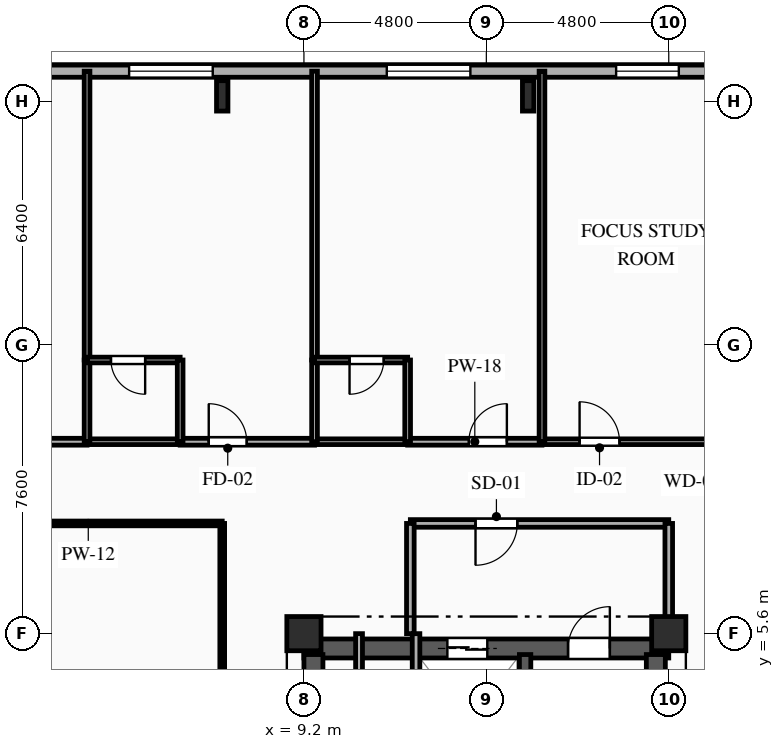
"""IFC4 building model, lengths in metres.
Left out: names, types, materials, properties, quantities, classifications, styles, units other than length and angle.
Written with IfcOpenShell. Run it as: python <this file> out.ifc"""

import sys

from ifc_helpers import new_model, si_unit, direction, frame, frame_2d, origin, origin_2d, place, context, subcontext, project, spatial, rectangle, i_section, extrude, element, fill, save


model = new_model("IFC4")
c1 = context("Model", 3, precision=1e-05, world=origin(), true_north=direction((0.0, 1.0)))
c2 = subcontext(c1, "Body", "Model", "MODEL_VIEW")
j1 = project(units=[si_unit("LENGTHUNIT", "METRE"), si_unit("PLANEANGLEUNIT", "RADIAN")], contexts=[c1])
p1 = place(None, origin())
s1 = spatial("IfcSite", under=j1, at=p1, CompositionType="ELEMENT")
p2 = place(p1, origin())
s2 = spatial("IfcBuilding", under=s1, at=p2, CompositionType="ELEMENT")
p3 = place(p2, frame((0.0, 0.0, 137.7)))
s3 = spatial("IfcBuildingStorey", under=s2, at=p3, CompositionType="ELEMENT", Elevation=137.7)
for number, where, z_axis, x_axis in (
    (1, (9.2, 5.6, 0.0), (0.0, 0.0, 1.0), (1.0, 0.0, 0.0)),
    (2, (18.8, 5.6, 0.0), (0.0, 0.0, 1.0), (1.0, 0.0, 0.0)),
):
    element("IfcColumn", number, at=place(p3, frame(where, z_axis=z_axis, x_axis=x_axis)), inside=s3, PredefinedType="COLUMN", context=c2, shape_type="SweptSolid", body=[
        extrude(rectangle(XDim=0.9, YDim=0.9, at=origin_2d()), origin(), (0.0, 0.0, 1.0), 3.35),
    ])
for number, where, z_axis, x_axis in (
    (3, (15.1, 19.75, 0.0), (0.0, 0.0, 1.0), (1.0, 0.0, 0.0)),
    (4, (7.05, 19.75, 0.0), (0.0, 0.0, 1.0), (1.0, 0.0, 0.0)),
):
    element("IfcColumn", number, at=place(p3, frame(where, z_axis=z_axis, x_axis=x_axis)), inside=s3, PredefinedType="COLUMN", context=c2, shape_type="SweptSolid", body=[
        extrude(i_section(OverallWidth=0.3, OverallDepth=0.8, WebThickness=0.018, FlangeThickness=0.033, FilletRadius=0.03, at=origin_2d()), origin(), (0.0, 0.0, 1.0), 3.35),
    ])
p4 = place(p3, frame((-25.8, 20.4, 0.0), z_axis=(0.0, 0.0, 1.0), x_axis=(1.0, 0.0, 0.0)))
e5 = element("IfcWall", 5, at=p4, inside=s3, PredefinedType="SOLIDWALL", context=c2, shape_type="SweptSolid", body=[
    extrude(rectangle(XDim=49.6, YDim=0.32, at=frame_2d((24.8, 0.0))), origin(), (0.0, 0.0, 1.0), 3.04),
])
p5 = place(p4, frame((2.135, 0.0, 0.85)))
e6 = element("IfcOpeningElement", 6, at=p5, cuts=e5, PredefinedType="OPENING", context=c2, shape_type="SweptSolid", body=[
    extrude(rectangle(XDim=1.65, YDim=1.85, at=frame_2d((0.825, 0.925))), frame((0.0, 0.17, 0.0), z_axis=(0.0, -1.0, 0.0), x_axis=(1.0, 0.0, 0.0)), (0.0, 0.0, 1.0), 0.34),
])
p6 = place(p4, frame((6.706, 0.0, 0.85)))
e7 = element("IfcOpeningElement", 7, at=p6, cuts=e5, PredefinedType="OPENING", context=c2, shape_type="SweptSolid", body=[
    extrude(rectangle(XDim=1.65, YDim=1.85, at=frame_2d((0.825, 0.925))), frame((0.0, 0.17, 0.0), z_axis=(0.0, -1.0, 0.0), x_axis=(1.0, 0.0, 0.0)), (0.0, 0.0, 1.0), 0.34),
])
p7 = place(p4, frame((14.81, 0.0, 0.85)))
e8 = element("IfcOpeningElement", 8, at=p7, cuts=e5, PredefinedType="OPENING", context=c2, shape_type="SweptSolid", body=[
    extrude(rectangle(XDim=1.5, YDim=1.85, at=frame_2d((0.75, 0.925))), frame((0.0, 0.17, 0.0), z_axis=(0.0, -1.0, 0.0), x_axis=(1.0, 0.0, 0.0)), (0.0, 0.0, 1.0), 0.34),
])
p8 = place(p4, frame((19.26, 0.0, 0.85)))
e9 = element("IfcOpeningElement", 9, at=p8, cuts=e5, PredefinedType="OPENING", context=c2, shape_type="SweptSolid", body=[
    extrude(rectangle(XDim=2.2, YDim=1.85, at=frame_2d((1.1, 0.925))), frame((0.0, 0.17, 0.0), z_axis=(0.0, -1.0, 0.0), x_axis=(1.0, 0.0, 0.0)), (0.0, 0.0, 1.0), 0.34),
])
p9 = place(p4, frame((25.26, 0.0, 0.85)))
e10 = element("IfcOpeningElement", 10, at=p9, cuts=e5, PredefinedType="OPENING", context=c2, shape_type="SweptSolid", body=[
    extrude(rectangle(XDim=2.2, YDim=1.85, at=frame_2d((1.1, 0.925))), frame((0.0, 0.17, 0.0), z_axis=(0.0, -1.0, 0.0), x_axis=(1.0, 0.0, 0.0)), (0.0, 0.0, 1.0), 0.34),
])
p10 = place(p4, frame((30.4, 0.0, 0.85)))
e11 = element("IfcOpeningElement", 11, at=p10, cuts=e5, PredefinedType="OPENING", context=c2, shape_type="SweptSolid", body=[
    extrude(rectangle(XDim=2.2, YDim=1.85, at=frame_2d((1.1, 0.925))), frame((0.0, 0.17, 0.0), z_axis=(0.0, -1.0, 0.0), x_axis=(1.0, 0.0, 0.0)), (0.0, 0.0, 1.0), 0.34),
])
p11 = place(p4, frame((37.18, 0.0, 0.85)))
e12 = element("IfcOpeningElement", 12, at=p11, cuts=e5, PredefinedType="OPENING", context=c2, shape_type="SweptSolid", body=[
    extrude(rectangle(XDim=2.2, YDim=1.85, at=frame_2d((1.1, 0.925))), frame((0.0, 0.17, 0.0), z_axis=(0.0, -1.0, 0.0), x_axis=(1.0, 0.0, 0.0)), (0.0, 0.0, 1.0), 0.34),
])
p12 = place(p4, frame((43.215, 0.0, 0.85)))
e13 = element("IfcOpeningElement", 13, at=p12, cuts=e5, PredefinedType="OPENING", context=c2, shape_type="SweptSolid", body=[
    extrude(rectangle(XDim=1.65, YDim=1.85, at=frame_2d((0.825, 0.925))), frame((0.0, 0.17, 0.0), z_axis=(0.0, -1.0, 0.0), x_axis=(1.0, 0.0, 0.0)), (0.0, 0.0, 1.0), 0.34),
])
p13 = place(p4, frame((47.45, 0.0, 0.85)))
e14 = element("IfcOpeningElement", 14, at=p13, cuts=e5, PredefinedType="OPENING", context=c2, shape_type="SweptSolid", body=[
    extrude(rectangle(XDim=1.1, YDim=1.85, at=frame_2d((0.55, 0.925))), frame((0.0, 0.17, 0.0), z_axis=(0.0, -1.0, 0.0), x_axis=(1.0, 0.0, 0.0)), (0.0, 0.0, 1.0), 0.34),
])
p14 = place(p3, frame((9.2, 5.21, 0.0), z_axis=(0.0, 0.0, 1.0), x_axis=(1.0, 0.0, 0.0)))
e15 = element("IfcWall", 15, at=p14, inside=s3, PredefinedType="SHEAR", context=c2, shape_type="SweptSolid", body=[
    extrude(rectangle(XDim=9.6, YDim=0.5, at=frame_2d((4.8, 0.0))), origin(), (0.0, 0.0, 1.0), 3.04),
])
p15 = place(p14, frame((6.95, 0.0, 0.0)))
e16 = element("IfcOpeningElement", 16, at=p15, cuts=e15, PredefinedType="OPENING", context=c2, shape_type="SweptSolid", body=[
    extrude(rectangle(XDim=1.1, YDim=2.15, at=frame_2d((0.55, 1.075))), frame((0.0, 0.26, 0.0), z_axis=(0.0, -1.0, 0.0), x_axis=(1.0, 0.0, 0.0)), (0.0, 0.0, 1.0), 0.52),
])
p16 = place(p14, frame((3.775, 0.0, 0.0)))
e17 = element("IfcOpeningElement", 17, at=p16, cuts=e15, PredefinedType="OPENING", context=c2, shape_type="SweptSolid", body=[
    extrude(rectangle(XDim=1.05, YDim=2.1, at=frame_2d((0.525, 1.05))), frame((0.0, 0.26, 0.0), z_axis=(0.0, -1.0, 0.0), x_axis=(1.0, 0.0, 0.0)), (0.0, 0.0, 1.0), 0.52),
])
p17 = place(p3, frame((9.45, -5.05, 0.0), z_axis=(0.0, 0.0, 1.0), x_axis=(0.0, 1.0, 0.0)))
e18 = element("IfcWall", 18, at=p17, inside=s3, PredefinedType="SHEAR", context=c2, shape_type="SweptSolid", body=[
    extrude(rectangle(XDim=10.1, YDim=0.5, at=frame_2d((5.05, 0.0))), origin(), (0.0, 0.0, 1.0), 3.04),
])
p18 = place(p17, frame((7.15, 0.0, 0.0)))
e19 = element("IfcOpeningElement", 19, at=p18, cuts=e18, PredefinedType="OPENING", context=c2, shape_type="SweptSolid", body=[
    extrude(rectangle(XDim=0.9, YDim=2.1, at=frame_2d((0.45, 1.05))), frame((0.0, 0.26, 0.0), z_axis=(0.0, -1.0, 0.0), x_axis=(1.0, 0.0, 0.0)), (0.0, 0.0, 1.0), 0.52),
])
p19 = place(p17, frame((2.4, 0.0, 0.0)))
e20 = element("IfcOpeningElement", 20, at=p19, cuts=e18, PredefinedType="OPENING", context=c2, shape_type="SweptSolid", body=[
    extrude(rectangle(XDim=1.2, YDim=2.15, at=frame_2d((0.6, 1.075))), frame((0.0, 0.26, 0.0), z_axis=(0.0, -1.0, 0.0), x_axis=(1.0, 0.0, 0.0)), (0.0, 0.0, 1.0), 0.52),
])
p20 = place(p3, frame((18.46, -5.05, 0.0), z_axis=(0.0, 0.0, 1.0), x_axis=(0.0, 1.0, 0.0)))
e21 = element("IfcWall", 21, at=p20, inside=s3, PredefinedType="SHEAR", context=c2, shape_type="SweptSolid", body=[
    extrude(rectangle(XDim=10.1, YDim=0.5, at=frame_2d((5.05, 0.0))), origin(), (0.0, 0.0, 1.0), 3.04),
])
p21 = place(p3, frame((15.02, -5.05, 0.0), z_axis=(0.0, 0.0, 1.0), x_axis=(0.0, 1.0, 0.0)))
e22 = element("IfcWall", 22, at=p21, inside=s3, PredefinedType="SHEAR", context=c2, shape_type="SweptSolid", body=[
    extrude(rectangle(XDim=10.1, YDim=0.3, at=frame_2d((5.05, 0.0))), origin(), (0.0, 0.0, 1.0), 3.04),
])
p22 = place(p3, frame((12.15, 5.6, 0.0), z_axis=(0.0, 0.0, 1.0), x_axis=(0.0, -1.0, 0.0)))
e23 = element("IfcWall", 23, at=p22, inside=s3, PredefinedType="PARTITIONING", context=c2, shape_type="SweptSolid", body=[
    extrude(rectangle(XDim=4.05, YDim=0.2, at=frame_2d((2.025, 0.0))), origin(), (0.0, 0.0, 1.0), 3.04),
])
p23 = place(p3, frame((18.8, 8.5, 0.0), z_axis=(0.0, 0.0, 1.0), x_axis=(-1.0, 0.0, 0.0)))
e24 = element("IfcWall", 24, at=p23, inside=s3, PredefinedType="PARTITIONING", context=c2, shape_type="SweptSolid", body=[
    extrude(rectangle(XDim=6.8, YDim=0.2, at=frame_2d((3.4, 0.0))), origin(), (0.0, 0.0, 1.0), 3.04),
])
p24 = place(p23, frame((3.985, 0.0, 0.0)))
e25 = element("IfcOpeningElement", 25, at=p24, cuts=e24, PredefinedType="OPENING", context=c2, shape_type="SweptSolid", body=[
    extrude(rectangle(XDim=1.1, YDim=2.15, at=frame_2d((0.55, 1.075))), frame((0.0, 0.11, 0.0), z_axis=(0.0, -1.0, 0.0), x_axis=(1.0, 0.0, 0.0)), (0.0, 0.0, 1.0), 0.22),
])
p25 = place(p3, frame((18.8, 5.6, 0.0), z_axis=(0.0, 0.0, 1.0), x_axis=(0.0, 1.0, 0.0)))
e26 = element("IfcWall", 26, at=p25, inside=s3, PredefinedType="PARTITIONING", context=c2, shape_type="SweptSolid", body=[
    extrude(rectangle(XDim=2.9, YDim=0.2, at=frame_2d((1.45, 0.0))), origin(), (0.0, 0.0, 1.0), 2.525),
])
p26 = place(p3, frame((12.0, 8.5, 0.0), z_axis=(0.0, 0.0, 1.0), x_axis=(0.0, -1.0, 0.0)))
e27 = element("IfcWall", 27, at=p26, inside=s3, PredefinedType="PARTITIONING", context=c2, shape_type="SweptSolid", body=[
    extrude(rectangle(XDim=2.9, YDim=0.2, at=frame_2d((1.45, 0.0))), origin(), (0.0, 0.0, 1.0), 3.04),
])
p27 = place(p3, frame((10.65, 1.55, 0.0), z_axis=(0.0, 0.0, 1.0), x_axis=(0.0, 1.0, 0.0)))
e28 = element("IfcWall", 28, at=p27, inside=s3, PredefinedType="PARTITIONING", context=c2, shape_type="SweptSolid", body=[
    extrude(rectangle(XDim=4.05, YDim=0.18, at=frame_2d((2.025, 0.0))), origin(), (0.0, 0.0, 1.0), 3.04),
])
p28 = place(p27, frame((0.829, 0.0, 0.0)))
e29 = element("IfcOpeningElement", 29, at=p28, cuts=e28, PredefinedType="OPENING", context=c2, shape_type="SweptSolid", body=[
    extrude(rectangle(XDim=0.9, YDim=2.1, at=frame_2d((0.45, 1.05))), frame((0.0, 0.1, 0.0), z_axis=(0.0, -1.0, 0.0), x_axis=(1.0, 0.0, 0.0)), (0.0, 0.0, 1.0), 0.2),
])
p29 = place(p3, frame((0.0, 10.65, 0.0), z_axis=(0.0, 0.0, 1.0), x_axis=(1.0, 0.0, 0.0)))
e30 = element("IfcWall", 30, at=p29, inside=s3, PredefinedType="PARTITIONING", context=c2, shape_type="SweptSolid", body=[
    extrude(rectangle(XDim=3.493, YDim=0.18, at=frame_2d((1.747, 0.0))), origin(), (0.0, 0.0, 1.0), 3.04),
])
p30 = place(p29, frame((0.747, 0.0, 0.0)))
e31 = element("IfcOpeningElement", 31, at=p30, cuts=e30, PredefinedType="OPENING", context=c2, shape_type="SweptSolid", body=[
    extrude(rectangle(XDim=1.0, YDim=2.15, at=frame_2d((0.5, 1.075))), frame((0.0, 0.1, 0.0), z_axis=(0.0, -1.0, 0.0), x_axis=(1.0, 0.0, 0.0)), (0.0, 0.0, 1.0), 0.2),
])
p31 = place(p3, frame((5.943, 10.65, 0.0), z_axis=(0.0, 0.0, 1.0), x_axis=(1.0, 0.0, 0.0)))
e32 = element("IfcWall", 32, at=p31, inside=s3, PredefinedType="PARTITIONING", context=c2, shape_type="SweptSolid", body=[
    extrude(rectangle(XDim=3.536, YDim=0.18, at=frame_2d((1.768, 0.0))), origin(), (0.0, 0.0, 1.0), 3.04),
])
p32 = place(p31, frame((0.752, 0.0, 0.0)))
e33 = element("IfcOpeningElement", 33, at=p32, cuts=e32, PredefinedType="OPENING", context=c2, shape_type="SweptSolid", body=[
    extrude(rectangle(XDim=1.0, YDim=2.15, at=frame_2d((0.5, 1.075))), frame((0.0, 0.1, 0.0), z_axis=(0.0, -1.0, 0.0), x_axis=(1.0, 0.0, 0.0)), (0.0, 0.0, 1.0), 0.2),
])
p33 = place(p3, frame((3.493, 10.65, 0.0), z_axis=(0.0, 0.0, 1.0), x_axis=(1.0, 0.0, 0.0)))
e34 = element("IfcWall", 34, at=p33, inside=s3, PredefinedType="PLUMBINGWALL", context=c2, shape_type="SweptSolid", body=[
    extrude(rectangle(XDim=2.45, YDim=0.15, at=frame_2d((1.225, 0.0))), origin(), (0.0, 0.0, 1.0), 3.04),
])
p34 = place(p3, frame((11.929, 10.65, 0.0), z_axis=(0.0, 0.0, 1.0), x_axis=(1.0, 0.0, 0.0)))
e35 = element("IfcWall", 35, at=p34, inside=s3, PredefinedType="PARTITIONING", context=c2, shape_type="SweptSolid", body=[
    extrude(rectangle(XDim=3.535, YDim=0.18, at=frame_2d((1.768, 0.0))), origin(), (0.0, 0.0, 1.0), 3.04),
])
p35 = place(p34, frame((1.611, 0.0, 0.0)))
e36 = element("IfcOpeningElement", 36, at=p35, cuts=e35, PredefinedType="OPENING", context=c2, shape_type="SweptSolid", body=[
    extrude(rectangle(XDim=1.0, YDim=2.15, at=frame_2d((0.5, 1.075))), frame((0.0, 0.1, 0.0), z_axis=(0.0, -1.0, 0.0), x_axis=(1.0, 0.0, 0.0)), (0.0, 0.0, 1.0), 0.2),
])
p36 = place(p3, frame((9.479, 10.65, 0.0), z_axis=(0.0, 0.0, 1.0), x_axis=(1.0, 0.0, 0.0)))
e37 = element("IfcWall", 37, at=p36, inside=s3, PredefinedType="PLUMBINGWALL", context=c2, shape_type="SweptSolid", body=[
    extrude(rectangle(XDim=2.45, YDim=0.15, at=frame_2d((1.225, 0.0))), origin(), (0.0, 0.0, 1.0), 3.04),
])
p37 = place(p3, frame((15.464, 10.65, 0.0), z_axis=(0.0, 0.0, 1.0), x_axis=(1.0, 0.0, 0.0)))
e38 = element("IfcWall", 38, at=p37, inside=s3, PredefinedType="PARTITIONING", context=c2, shape_type="SweptSolid", body=[
    extrude(rectangle(XDim=5.486, YDim=0.15, at=frame_2d((2.743, 0.0))), origin(), (0.0, 0.0, 1.0), 3.04),
])
p38 = place(p37, frame((0.99, 0.0, 0.0)))
e39 = element("IfcOpeningElement", 39, at=p38, cuts=e38, PredefinedType="OPENING", context=c2, shape_type="SweptSolid", body=[
    extrude(rectangle(XDim=1.05, YDim=2.15, at=frame_2d((0.525, 1.075))), frame((0.0, 0.085, 0.0), z_axis=(0.0, -1.0, 0.0), x_axis=(1.0, 0.0, 0.0)), (0.0, 0.0, 1.0), 0.17),
])
p39 = place(p3, frame((7.05, 8.5, 0.0), z_axis=(0.0, 0.0, 1.0), x_axis=(-1.0, 0.0, 0.0)))
e40 = element("IfcWall", 40, at=p39, inside=s3, PredefinedType="PARTITIONING", context=c2, shape_type="SweptSolid", body=[
    extrude(rectangle(XDim=7.05, YDim=0.125, at=frame_2d((3.525, 0.0))), origin(), (0.0, 0.0, 1.0), 3.04),
])
p40 = place(p3, frame((7.05, -0.8, 0.0), z_axis=(0.0, 0.0, 1.0), x_axis=(0.0, 1.0, 0.0)))
e41 = element("IfcWall", 41, at=p40, inside=s3, PredefinedType="PARTITIONING", context=c2, shape_type="SweptSolid", body=[
    extrude(rectangle(XDim=9.3, YDim=0.125, at=frame_2d((4.65, 0.0))), origin(), (0.0, 0.0, 1.0), 3.04),
])
p41 = place(p40, frame((1.479, 0.0, 0.0)))
e42 = element("IfcOpeningElement", 42, at=p41, cuts=e41, PredefinedType="OPENING", context=c2, shape_type="SweptSolid", body=[
    extrude(rectangle(XDim=0.95, YDim=2.1, at=frame_2d((0.475, 1.05))), frame((0.0, 0.073, 0.0), z_axis=(0.0, -1.0, 0.0), x_axis=(1.0, 0.0, 0.0)), (0.0, 0.0, 1.0), 0.145),
])
p42 = place(p3, frame((3.493, 20.4, 0.0), z_axis=(0.0, 0.0, 1.0), x_axis=(0.0, -1.0, 0.0)))
e43 = element("IfcWall", 43, at=p42, inside=s3, PredefinedType="PARTITIONING", context=c2, shape_type="SweptSolid", body=[
    extrude(rectangle(XDim=7.6, YDim=0.15, at=frame_2d((3.8, 0.0))), origin(), (0.0, 0.0, 1.0), 3.04),
])
p43 = place(p3, frame((3.493, 12.8, 0.0), z_axis=(0.0, 0.0, 1.0), x_axis=(0.0, -1.0, 0.0)))
e44 = element("IfcWall", 44, at=p43, inside=s3, PredefinedType="PLUMBINGWALL", context=c2, shape_type="SweptSolid", body=[
    extrude(rectangle(XDim=2.15, YDim=0.15, at=frame_2d((1.075, 0.0))), origin(), (0.0, 0.0, 1.0), 3.04),
])
p44 = place(p3, frame((5.943, 12.8, 0.0), z_axis=(0.0, 0.0, 1.0), x_axis=(-1.0, 0.0, 0.0)))
e45 = element("IfcWall", 45, at=p44, inside=s3, PredefinedType="PLUMBINGWALL", context=c2, shape_type="SweptSolid", body=[
    extrude(rectangle(XDim=2.45, YDim=0.15, at=frame_2d((1.225, 0.0))), origin(), (0.0, 0.0, 1.0), 3.04),
])
p45 = place(p44, frame((0.921, 0.0, 0.0)))
e46 = element("IfcOpeningElement", 46, at=p45, cuts=e45, PredefinedType="OPENING", context=c2, shape_type="SweptSolid", body=[
    extrude(rectangle(XDim=0.9, YDim=2.1, at=frame_2d((0.45, 1.05))), frame((0.0, 0.085, 0.0), z_axis=(0.0, -1.0, 0.0), x_axis=(1.0, 0.0, 0.0)), (0.0, 0.0, 1.0), 0.17),
])
p46 = place(p3, frame((5.943, 10.65, 0.0), z_axis=(0.0, 0.0, 1.0), x_axis=(0.0, 1.0, 0.0)))
e47 = element("IfcWall", 47, at=p46, inside=s3, PredefinedType="PLUMBINGWALL", context=c2, shape_type="SweptSolid", body=[
    extrude(rectangle(XDim=2.15, YDim=0.15, at=frame_2d((1.075, 0.0))), origin(), (0.0, 0.0, 1.0), 3.04),
])
p47 = place(p3, frame((9.479, 20.4, 0.0), z_axis=(0.0, 0.0, 1.0), x_axis=(0.0, -1.0, 0.0)))
e48 = element("IfcWall", 48, at=p47, inside=s3, PredefinedType="PARTITIONING", context=c2, shape_type="SweptSolid", body=[
    extrude(rectangle(XDim=7.6, YDim=0.15, at=frame_2d((3.8, 0.0))), origin(), (0.0, 0.0, 1.0), 3.04),
])
p48 = place(p3, frame((9.479, 12.8, 0.0), z_axis=(0.0, 0.0, 1.0), x_axis=(0.0, -1.0, 0.0)))
e49 = element("IfcWall", 49, at=p48, inside=s3, PredefinedType="PLUMBINGWALL", context=c2, shape_type="SweptSolid", body=[
    extrude(rectangle(XDim=2.15, YDim=0.15, at=frame_2d((1.075, 0.0))), origin(), (0.0, 0.0, 1.0), 3.04),
])
p49 = place(p3, frame((11.929, 12.8, 0.0), z_axis=(0.0, 0.0, 1.0), x_axis=(-1.0, 0.0, 0.0)))
e50 = element("IfcWall", 50, at=p49, inside=s3, PredefinedType="PLUMBINGWALL", context=c2, shape_type="SweptSolid", body=[
    extrude(rectangle(XDim=2.45, YDim=0.15, at=frame_2d((1.225, 0.0))), origin(), (0.0, 0.0, 1.0), 3.04),
])
p50 = place(p49, frame((0.629, 0.0, 0.0)))
e51 = element("IfcOpeningElement", 51, at=p50, cuts=e50, PredefinedType="OPENING", context=c2, shape_type="SweptSolid", body=[
    extrude(rectangle(XDim=0.9, YDim=2.1, at=frame_2d((0.45, 1.05))), frame((0.0, 0.085, 0.0), z_axis=(0.0, -1.0, 0.0), x_axis=(1.0, 0.0, 0.0)), (0.0, 0.0, 1.0), 0.17),
])
p51 = place(p3, frame((11.929, 10.65, 0.0), z_axis=(0.0, 0.0, 1.0), x_axis=(0.0, 1.0, 0.0)))
e52 = element("IfcWall", 52, at=p51, inside=s3, PredefinedType="PLUMBINGWALL", context=c2, shape_type="SweptSolid", body=[
    extrude(rectangle(XDim=2.15, YDim=0.15, at=frame_2d((1.075, 0.0))), origin(), (0.0, 0.0, 1.0), 3.04),
])
p52 = place(p3, frame((15.464, 20.4, 0.0), z_axis=(0.0, 0.0, 1.0), x_axis=(0.0, -1.0, 0.0)))
e53 = element("IfcWall", 53, at=p52, inside=s3, PredefinedType="PARTITIONING", context=c2, shape_type="SweptSolid", body=[
    extrude(rectangle(XDim=9.75, YDim=0.15, at=frame_2d((4.875, 0.0))), origin(), (0.0, 0.0, 1.0), 2.525),
])
p53 = place(p10, origin())
e54 = element("IfcWindow", 54, at=p53, inside=s3, PartitioningType="SINGLE_PANEL", PredefinedType="WINDOW", context=c2, shape_type="SweptSolid", body=[
    extrude(rectangle(XDim=2.2, YDim=1.85, at=frame_2d((1.1, 0.925))), frame((0.0, 0.03, 0.0), z_axis=(0.0, -1.0, 0.0), x_axis=(1.0, 0.0, 0.0)), (0.0, 0.0, 1.0), 0.06),
])
fill(e11, e54)
p54 = place(p11, origin())
e55 = element("IfcWindow", 55, at=p54, inside=s3, PartitioningType="SINGLE_PANEL", PredefinedType="WINDOW", context=c2, shape_type="SweptSolid", body=[
    extrude(rectangle(XDim=2.2, YDim=1.85, at=frame_2d((1.1, 0.925))), frame((0.0, 0.03, 0.0), z_axis=(0.0, -1.0, 0.0), x_axis=(1.0, 0.0, 0.0)), (0.0, 0.0, 1.0), 0.06),
])
fill(e12, e55)
p55 = place(p12, origin())
e56 = element("IfcWindow", 56, at=p55, inside=s3, PartitioningType="SINGLE_PANEL", PredefinedType="WINDOW", context=c2, shape_type="SweptSolid", body=[
    extrude(rectangle(XDim=1.65, YDim=1.85, at=frame_2d((0.825, 0.925))), frame((0.0, 0.03, 0.0), z_axis=(0.0, -1.0, 0.0), x_axis=(1.0, 0.0, 0.0)), (0.0, 0.0, 1.0), 0.06),
])
fill(e13, e56)
p56 = place(p15, origin())
e57 = element("IfcDoor", 57, at=p56, inside=s3, OperationType="SINGLE_SWING_RIGHT", PredefinedType="DOOR", context=c2, shape_type="SweptSolid", body=[
    extrude(rectangle(XDim=1.1, YDim=2.15, at=frame_2d((0.55, 1.075))), frame((0.0, 0.025, 0.0), z_axis=(0.0, -1.0, 0.0), x_axis=(1.0, 0.0, 0.0)), (0.0, 0.0, 1.0), 0.05),
])
fill(e16, e57)
p57 = place(p16, origin())
e58 = element("IfcDoor", 58, at=p57, inside=s3, OperationType="DOUBLE_DOOR_SLIDING", PredefinedType="DOOR", context=c2, shape_type="SweptSolid", body=[
    extrude(rectangle(XDim=1.05, YDim=2.1, at=frame_2d((0.525, 1.05))), frame((0.0, 0.025, 0.0), z_axis=(0.0, -1.0, 0.0), x_axis=(1.0, 0.0, 0.0)), (0.0, 0.0, 1.0), 0.05),
])
fill(e17, e58)
p58 = place(p24, origin())
e59 = element("IfcDoor", 59, at=p58, inside=s3, OperationType="SINGLE_SWING_RIGHT", PredefinedType="DOOR", context=c2, shape_type="SweptSolid", body=[
    extrude(rectangle(XDim=1.1, YDim=2.15, at=frame_2d((0.55, 1.075))), frame((0.0, 0.025, 0.0), z_axis=(0.0, -1.0, 0.0), x_axis=(1.0, 0.0, 0.0)), (0.0, 0.0, 1.0), 0.05),
])
fill(e25, e59)
p59 = place(p32, origin())
e60 = element("IfcDoor", 60, at=p59, inside=s3, OperationType="SINGLE_SWING_LEFT", PredefinedType="DOOR", context=c2, shape_type="SweptSolid", body=[
    extrude(rectangle(XDim=1.0, YDim=2.15, at=frame_2d((0.5, 1.075))), frame((0.0, 0.025, 0.0), z_axis=(0.0, -1.0, 0.0), x_axis=(1.0, 0.0, 0.0)), (0.0, 0.0, 1.0), 0.05),
])
fill(e33, e60)
p60 = place(p35, origin())
e61 = element("IfcDoor", 61, at=p60, inside=s3, OperationType="SINGLE_SWING_RIGHT", PredefinedType="DOOR", context=c2, shape_type="SweptSolid", body=[
    extrude(rectangle(XDim=1.0, YDim=2.15, at=frame_2d((0.5, 1.075))), frame((0.0, 0.025, 0.0), z_axis=(0.0, -1.0, 0.0), x_axis=(1.0, 0.0, 0.0)), (0.0, 0.0, 1.0), 0.05),
])
fill(e36, e61)
p61 = place(p38, origin())
e62 = element("IfcDoor", 62, at=p61, inside=s3, OperationType="SINGLE_SWING_LEFT", PredefinedType="DOOR", context=c2, shape_type="SweptSolid", body=[
    extrude(rectangle(XDim=1.05, YDim=2.15, at=frame_2d((0.525, 1.075))), frame((0.0, 0.025, 0.0), z_axis=(0.0, -1.0, 0.0), x_axis=(1.0, 0.0, 0.0)), (0.0, 0.0, 1.0), 0.05),
])
fill(e39, e62)
p62 = place(p45, origin())
e63 = element("IfcDoor", 63, at=p62, inside=s3, OperationType="SINGLE_SWING_LEFT", PredefinedType="DOOR", context=c2, shape_type="SweptSolid", body=[
    extrude(rectangle(XDim=0.9, YDim=2.1, at=frame_2d((0.45, 1.05))), frame((0.0, 0.025, 0.0), z_axis=(0.0, -1.0, 0.0), x_axis=(1.0, 0.0, 0.0)), (0.0, 0.0, 1.0), 0.05),
])
fill(e46, e63)
p63 = place(p50, origin())
e64 = element("IfcDoor", 64, at=p63, inside=s3, OperationType="SINGLE_SWING_RIGHT", PredefinedType="DOOR", context=c2, shape_type="SweptSolid", body=[
    extrude(rectangle(XDim=0.9, YDim=2.1, at=frame_2d((0.45, 1.05))), frame((0.0, 0.025, 0.0), z_axis=(0.0, -1.0, 0.0), x_axis=(1.0, 0.0, 0.0)), (0.0, 0.0, 1.0), 0.05),
])
fill(e51, e64)
save(model, sys.argv[1])
